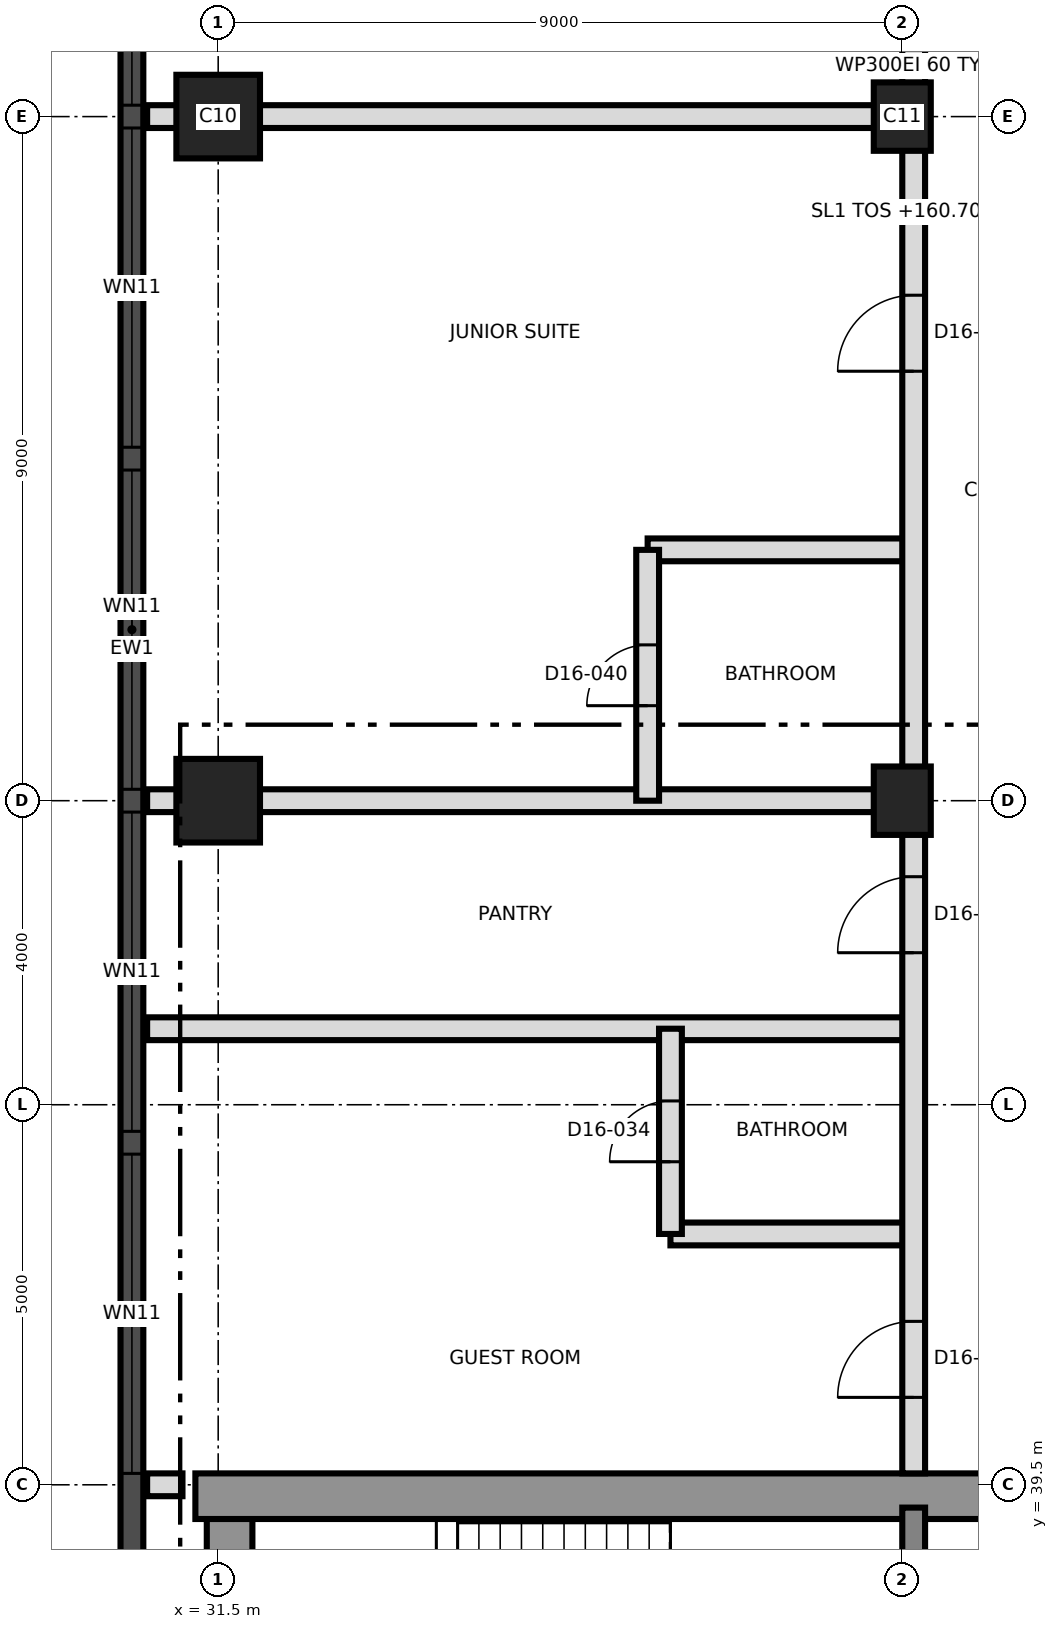
"""IFC4 building model, lengths in metres.
Left out: names, types, materials, properties, quantities, classifications, styles, units other than length and angle.
Written with IfcOpenShell. Run it as: python <this file> out.ifc"""

import sys

from ifc_helpers import new_model, si_unit, direction, frame, frame_2d, origin, origin_2d, place, context, subcontext, project, spatial, rectangle, extrude, element, fill, save


model = new_model("IFC4")
c1 = context("Model", 3, precision=1e-05, world=origin(), true_north=direction((0.0, 1.0)))
c2 = subcontext(c1, "Body", "Model", "MODEL_VIEW")
j1 = project(units=[si_unit("LENGTHUNIT", "METRE"), si_unit("PLANEANGLEUNIT", "RADIAN")], contexts=[c1])
p1 = place(None, origin())
s1 = spatial("IfcSite", under=j1, at=p1, CompositionType="ELEMENT")
p2 = place(p1, origin())
s2 = spatial("IfcBuilding", under=s1, at=p2, CompositionType="ELEMENT")
p3 = place(p2, frame((0.0, 0.0, 160.7)))
s3 = spatial("IfcBuildingStorey", under=s2, at=p3, CompositionType="ELEMENT", Elevation=160.7)
p4 = place(p3, frame((31.65, 21.8, 0.0), z_axis=(0.0, 0.0, 1.0), x_axis=(0.0, 1.0, 0.0)))
e1 = element("IfcWall", 1, at=p4, inside=s3, PredefinedType="SHEAR", context=c2, shape_type="SweptSolid", body=[
    extrude(rectangle(XDim=17.4, YDim=0.6, at=frame_2d((8.7, 0.0))), origin(), (0.0, 0.0, 1.0), 3.7),
])
p5 = place(p3, frame((31.2, 39.35, 0.0), z_axis=(0.0, 0.0, 1.0), x_axis=(1.0, 0.0, 0.0)))
e2 = element("IfcWall", 2, at=p5, inside=s3, PredefinedType="SHEAR", context=c2, shape_type="SweptSolid", body=[
    extrude(rectangle(XDim=27.0, YDim=0.6, at=frame_2d((13.5, 0.0))), origin(), (0.0, 0.0, 1.0), 3.7),
])
p6 = place(p5, frame((10.5, 0.0, 0.0)))
e3 = element("IfcOpeningElement", 3, at=p6, cuts=e2, PredefinedType="OPENING", context=c2, shape_type="SweptSolid", body=[
    extrude(rectangle(XDim=1.2, YDim=2.1, at=frame_2d((0.6, 1.05))), frame((0.0, 0.31, 0.0), z_axis=(0.0, -1.0, 0.0), x_axis=(1.0, 0.0, 0.0)), (0.0, 0.0, 1.0), 0.62),
])
p7 = place(p3, frame((40.65, 33.5, 0.0), z_axis=(0.0, 0.0, 1.0), x_axis=(0.0, 1.0, 0.0)))
e4 = element("IfcWall", 4, at=p7, inside=s3, PredefinedType="SHEAR", context=c2, shape_type="SweptSolid", body=[
    extrude(rectangle(XDim=5.7, YDim=0.3, at=frame_2d((2.85, 0.0))), origin(), (0.0, 0.0, 1.0), 3.7),
])
p8 = place(p3, frame((31.5, 48.5, 0.0), z_axis=(0.0, 0.0, 1.0), x_axis=(1.0, 0.0, 0.0)))
e5 = element("IfcColumn", 5, at=p8, inside=s3, PredefinedType="COLUMN", context=c2, shape_type="SweptSolid", body=[
    extrude(rectangle(XDim=1.1, YDim=1.1, at=origin_2d()), origin(), (0.0, 0.0, 1.0), 3.7),
])
p9 = place(p3, frame((40.5, 48.5, 0.0), z_axis=(0.0, 0.0, 1.0), x_axis=(0.0, 1.0, 0.0)))
e6 = element("IfcColumn", 6, at=p9, inside=s3, PredefinedType="COLUMN", context=c2, shape_type="SweptSolid", body=[
    extrude(rectangle(XDim=0.9, YDim=0.75, at=origin_2d()), origin(), (0.0, 0.0, 1.0), 3.7),
])
p10 = place(p3, frame((31.5, 57.5, 0.0), z_axis=(0.0, 0.0, 1.0), x_axis=(1.0, 0.0, 0.0)))
e7 = element("IfcColumn", 7, at=p10, inside=s3, PredefinedType="COLUMN", context=c2, shape_type="SweptSolid", body=[
    extrude(rectangle(XDim=1.1, YDim=1.1, at=origin_2d()), origin(), (0.0, 0.0, 1.0), 3.7),
])
p11 = place(p3, frame((40.5, 57.5, 0.0), z_axis=(0.0, 0.0, 1.0), x_axis=(0.0, 1.0, 0.0)))
e8 = element("IfcColumn", 8, at=p11, inside=s3, PredefinedType="COLUMN", context=c2, shape_type="SweptSolid", body=[
    extrude(rectangle(XDim=0.9, YDim=0.75, at=origin_2d()), origin(), (0.0, 0.0, 1.0), 3.7),
])
p12 = place(p3, frame((30.365, 66.992, 0.0), z_axis=(0.0, 0.0, 1.0), x_axis=(0.0, -1.0, 0.0)))
e9 = element("IfcWall", 9, at=p12, inside=s3, PredefinedType="SOLIDWALL", context=c2, shape_type="SweptSolid", body=[
    extrude(rectangle(XDim=32.981, YDim=0.3, at=frame_2d((16.491, 0.0))), origin(), (0.0, 0.0, 1.0), 3.4),
])
p13 = place(p12, frame((1.596, 0.0, 0.3)))
e10 = element("IfcOpeningElement", 10, at=p13, cuts=e9, PredefinedType="OPENING", context=c2, shape_type="SweptSolid", body=[
    extrude(rectangle(XDim=1.8, YDim=2.4, at=frame_2d((0.9, 1.2))), frame((0.0, 0.16, 0.0), z_axis=(0.0, -1.0, 0.0), x_axis=(1.0, 0.0, 0.0)), (0.0, 0.0, 1.0), 0.32),
])
p14 = place(p12, frame((5.142, 0.0, 0.9)))
e11 = element("IfcOpeningElement", 11, at=p14, cuts=e9, PredefinedType="OPENING", context=c2, shape_type="SweptSolid", body=[
    extrude(rectangle(XDim=4.2, YDim=1.5, at=frame_2d((2.1, 0.75))), frame((0.0, 0.16, 0.0), z_axis=(0.0, -1.0, 0.0), x_axis=(1.0, 0.0, 0.0)), (0.0, 0.0, 1.0), 0.32),
])
p15 = place(p12, frame((9.642, 0.0, 0.9)))
e12 = element("IfcOpeningElement", 12, at=p15, cuts=e9, PredefinedType="OPENING", context=c2, shape_type="SweptSolid", body=[
    extrude(rectangle(XDim=4.2, YDim=1.5, at=frame_2d((2.1, 0.75))), frame((0.0, 0.16, 0.0), z_axis=(0.0, -1.0, 0.0), x_axis=(1.0, 0.0, 0.0)), (0.0, 0.0, 1.0), 0.32),
])
p16 = place(p12, frame((14.142, 0.0, 0.9)))
e13 = element("IfcOpeningElement", 13, at=p16, cuts=e9, PredefinedType="OPENING", context=c2, shape_type="SweptSolid", body=[
    extrude(rectangle(XDim=4.2, YDim=1.5, at=frame_2d((2.1, 0.75))), frame((0.0, 0.16, 0.0), z_axis=(0.0, -1.0, 0.0), x_axis=(1.0, 0.0, 0.0)), (0.0, 0.0, 1.0), 0.32),
])
p17 = place(p12, frame((18.642, 0.0, 0.9)))
e14 = element("IfcOpeningElement", 14, at=p17, cuts=e9, PredefinedType="OPENING", context=c2, shape_type="SweptSolid", body=[
    extrude(rectangle(XDim=4.2, YDim=1.5, at=frame_2d((2.1, 0.75))), frame((0.0, 0.16, 0.0), z_axis=(0.0, -1.0, 0.0), x_axis=(1.0, 0.0, 0.0)), (0.0, 0.0, 1.0), 0.32),
])
p18 = place(p12, frame((23.142, 0.0, 0.9)))
e15 = element("IfcOpeningElement", 15, at=p18, cuts=e9, PredefinedType="OPENING", context=c2, shape_type="SweptSolid", body=[
    extrude(rectangle(XDim=4.2, YDim=1.5, at=frame_2d((2.1, 0.75))), frame((0.0, 0.16, 0.0), z_axis=(0.0, -1.0, 0.0), x_axis=(1.0, 0.0, 0.0)), (0.0, 0.0, 1.0), 0.32),
])
p19 = place(p12, frame((29.337, 0.0, 0.3)))
e16 = element("IfcOpeningElement", 16, at=p19, cuts=e9, PredefinedType="OPENING", context=c2, shape_type="SweptSolid", body=[
    extrude(rectangle(XDim=1.8, YDim=2.4, at=frame_2d((0.9, 1.2))), frame((0.0, 0.16, 0.0), z_axis=(0.0, -1.0, 0.0), x_axis=(1.0, 0.0, 0.0)), (0.0, 0.0, 1.0), 0.32),
])
p20 = place(p3, frame((30.565, 39.5, 0.0), z_axis=(0.0, 0.0, 1.0), x_axis=(1.0, 0.0, 0.0)))
e17 = element("IfcWall", 17, at=p20, inside=s3, PredefinedType="PARTITIONING", context=c2, shape_type="SweptSolid", body=[
    extrude(rectangle(XDim=0.465, YDim=0.3, at=frame_2d((0.232, 0.0))), origin(), (0.0, 0.0, 1.0), 3.4),
])
p21 = place(p3, frame((37.45, 42.8, 0.0), z_axis=(0.0, 0.0, 1.0), x_axis=(1.0, 0.0, 0.0)))
e18 = element("IfcWall", 18, at=p21, inside=s3, PredefinedType="PARTITIONING", context=c2, shape_type="SweptSolid", body=[
    extrude(rectangle(XDim=3.2, YDim=0.3, at=frame_2d((1.6, 0.0))), origin(), (0.0, 0.0, 1.0), 3.4),
])
for number, where, z_axis, x_axis in (
    (19, (30.565, 45.5, 0.0), (0.0, 0.0, 1.0), (1.0, 0.0, 0.0)),
    (20, (30.565, 48.5, 0.0), (0.0, 0.0, 1.0), (1.0, 0.0, 0.0)),
):
    element("IfcWall", number, at=place(p3, frame(where, z_axis=z_axis, x_axis=x_axis)), inside=s3, PredefinedType="PARTITIONING", context=c2, shape_type="SweptSolid", body=[
        extrude(rectangle(XDim=10.085, YDim=0.3, at=frame_2d((5.042, 0.0))), origin(), (0.0, 0.0, 1.0), 3.4),
    ])
p22 = place(p3, frame((37.15, 51.8, 0.0), z_axis=(0.0, 0.0, 1.0), x_axis=(1.0, 0.0, 0.0)))
e21 = element("IfcWall", 21, at=p22, inside=s3, PredefinedType="PARTITIONING", context=c2, shape_type="SweptSolid", body=[
    extrude(rectangle(XDim=3.5, YDim=0.3, at=frame_2d((1.75, 0.0))), origin(), (0.0, 0.0, 1.0), 3.4),
])
p23 = place(p3, frame((30.565, 57.5, 0.0), z_axis=(0.0, 0.0, 1.0), x_axis=(1.0, 0.0, 0.0)))
e22 = element("IfcWall", 22, at=p23, inside=s3, PredefinedType="PARTITIONING", context=c2, shape_type="SweptSolid", body=[
    extrude(rectangle(XDim=10.085, YDim=0.3, at=frame_2d((5.042, 0.0))), origin(), (0.0, 0.0, 1.0), 3.4),
])
p24 = place(p3, frame((37.15, 48.5, 0.0), z_axis=(0.0, 0.0, 1.0), x_axis=(0.0, 1.0, 0.0)))
e23 = element("IfcWall", 23, at=p24, inside=s3, PredefinedType="PARTITIONING", context=c2, shape_type="SweptSolid", body=[
    extrude(rectangle(XDim=3.3, YDim=0.3, at=frame_2d((1.65, 0.0))), origin(), (0.0, 0.0, 1.0), 3.4),
])
p25 = place(p24, frame((1.25, 0.0, 0.0)))
e24 = element("IfcOpeningElement", 24, at=p25, cuts=e23, PredefinedType="OPENING", context=c2, shape_type="SweptSolid", body=[
    extrude(rectangle(XDim=0.8, YDim=2.1, at=frame_2d((0.4, 1.05))), frame((0.0, 0.16, 0.0), z_axis=(0.0, -1.0, 0.0), x_axis=(1.0, 0.0, 0.0)), (0.0, 0.0, 1.0), 0.32),
])
p26 = place(p3, frame((37.45, 42.8, 0.0), z_axis=(0.0, 0.0, 1.0), x_axis=(0.0, 1.0, 0.0)))
e25 = element("IfcWall", 25, at=p26, inside=s3, PredefinedType="PARTITIONING", context=c2, shape_type="SweptSolid", body=[
    extrude(rectangle(XDim=2.7, YDim=0.3, at=frame_2d((1.35, 0.0))), origin(), (0.0, 0.0, 1.0), 3.4),
])
p27 = place(p26, frame((0.95, 0.0, 0.0)))
e26 = element("IfcOpeningElement", 26, at=p27, cuts=e25, PredefinedType="OPENING", context=c2, shape_type="SweptSolid", body=[
    extrude(rectangle(XDim=0.8, YDim=2.1, at=frame_2d((0.4, 1.05))), frame((0.0, 0.16, 0.0), z_axis=(0.0, -1.0, 0.0), x_axis=(1.0, 0.0, 0.0)), (0.0, 0.0, 1.0), 0.32),
])
p28 = place(p3, frame((40.65, 39.65, 0.0), z_axis=(0.0, 0.0, 1.0), x_axis=(0.0, 1.0, 0.0)))
e27 = element("IfcWall", 27, at=p28, inside=s3, PredefinedType="PARTITIONING", context=c2, shape_type="SweptSolid", body=[
    extrude(rectangle(XDim=37.025, YDim=0.3, at=frame_2d((18.513, 0.0))), origin(), (0.0, 0.0, 1.0), 3.4),
])
p29 = place(p28, frame((1.0, 0.0, 0.0)))
e28 = element("IfcOpeningElement", 28, at=p29, cuts=e27, PredefinedType="OPENING", context=c2, shape_type="SweptSolid", body=[
    extrude(rectangle(XDim=1.0, YDim=2.1, at=frame_2d((0.5, 1.05))), frame((0.0, 0.16, 0.0), z_axis=(0.0, -1.0, 0.0), x_axis=(1.0, 0.0, 0.0)), (0.0, 0.0, 1.0), 0.32),
])
p30 = place(p28, frame((6.85, 0.0, 0.0)))
e29 = element("IfcOpeningElement", 29, at=p30, cuts=e27, PredefinedType="OPENING", context=c2, shape_type="SweptSolid", body=[
    extrude(rectangle(XDim=1.0, YDim=2.1, at=frame_2d((0.5, 1.05))), frame((0.0, 0.16, 0.0), z_axis=(0.0, -1.0, 0.0), x_axis=(1.0, 0.0, 0.0)), (0.0, 0.0, 1.0), 0.32),
])
p31 = place(p28, frame((14.5, 0.0, 0.0)))
e30 = element("IfcOpeningElement", 30, at=p31, cuts=e27, PredefinedType="OPENING", context=c2, shape_type="SweptSolid", body=[
    extrude(rectangle(XDim=1.0, YDim=2.4, at=frame_2d((0.5, 1.2))), frame((0.0, 0.16, 0.0), z_axis=(0.0, -1.0, 0.0), x_axis=(1.0, 0.0, 0.0)), (0.0, 0.0, 1.0), 0.32),
])
p32 = place(p28, frame((21.35, 0.0, 0.0)))
e31 = element("IfcOpeningElement", 31, at=p32, cuts=e27, PredefinedType="OPENING", context=c2, shape_type="SweptSolid", body=[
    extrude(rectangle(XDim=1.0, YDim=2.4, at=frame_2d((0.5, 1.2))), frame((0.0, 0.16, 0.0), z_axis=(0.0, -1.0, 0.0), x_axis=(1.0, 0.0, 0.0)), (0.0, 0.0, 1.0), 0.32),
])
p33 = place(p14, origin())
e32 = element("IfcWindow", 32, at=p33, inside=s3, PartitioningType="SINGLE_PANEL", PredefinedType="WINDOW", context=c2, shape_type="SweptSolid", body=[
    extrude(rectangle(XDim=4.2, YDim=1.5, at=frame_2d((2.1, 0.75))), frame((0.0, 0.03, 0.0), z_axis=(0.0, -1.0, 0.0), x_axis=(1.0, 0.0, 0.0)), (0.0, 0.0, 1.0), 0.06),
])
fill(e11, e32)
p34 = place(p15, origin())
e33 = element("IfcWindow", 33, at=p34, inside=s3, PartitioningType="SINGLE_PANEL", PredefinedType="WINDOW", context=c2, shape_type="SweptSolid", body=[
    extrude(rectangle(XDim=4.2, YDim=1.5, at=frame_2d((2.1, 0.75))), frame((0.0, 0.03, 0.0), z_axis=(0.0, -1.0, 0.0), x_axis=(1.0, 0.0, 0.0)), (0.0, 0.0, 1.0), 0.06),
])
fill(e12, e33)
p35 = place(p16, origin())
e34 = element("IfcWindow", 34, at=p35, inside=s3, PartitioningType="SINGLE_PANEL", PredefinedType="WINDOW", context=c2, shape_type="SweptSolid", body=[
    extrude(rectangle(XDim=4.2, YDim=1.5, at=frame_2d((2.1, 0.75))), frame((0.0, 0.03, 0.0), z_axis=(0.0, -1.0, 0.0), x_axis=(1.0, 0.0, 0.0)), (0.0, 0.0, 1.0), 0.06),
])
fill(e13, e34)
p36 = place(p17, origin())
e35 = element("IfcWindow", 35, at=p36, inside=s3, PartitioningType="SINGLE_PANEL", PredefinedType="WINDOW", context=c2, shape_type="SweptSolid", body=[
    extrude(rectangle(XDim=4.2, YDim=1.5, at=frame_2d((2.1, 0.75))), frame((0.0, 0.03, 0.0), z_axis=(0.0, -1.0, 0.0), x_axis=(1.0, 0.0, 0.0)), (0.0, 0.0, 1.0), 0.06),
])
fill(e14, e35)
p37 = place(p18, origin())
e36 = element("IfcWindow", 36, at=p37, inside=s3, PartitioningType="SINGLE_PANEL", PredefinedType="WINDOW", context=c2, shape_type="SweptSolid", body=[
    extrude(rectangle(XDim=4.2, YDim=1.5, at=frame_2d((2.1, 0.75))), frame((0.0, 0.03, 0.0), z_axis=(0.0, -1.0, 0.0), x_axis=(1.0, 0.0, 0.0)), (0.0, 0.0, 1.0), 0.06),
])
fill(e15, e36)
p38 = place(p27, origin())
e37 = element("IfcDoor", 37, at=p38, inside=s3, OperationType="SINGLE_SWING_LEFT", PredefinedType="DOOR", context=c2, shape_type="SweptSolid", body=[
    extrude(rectangle(XDim=0.8, YDim=2.1, at=frame_2d((0.4, 1.05))), frame((0.0, 0.025, 0.0), z_axis=(0.0, -1.0, 0.0), x_axis=(1.0, 0.0, 0.0)), (0.0, 0.0, 1.0), 0.05),
])
fill(e26, e37)
p39 = place(p29, origin())
e38 = element("IfcDoor", 38, at=p39, inside=s3, OperationType="SINGLE_SWING_RIGHT", PredefinedType="DOOR", context=c2, shape_type="SweptSolid", body=[
    extrude(rectangle(XDim=1.0, YDim=2.1, at=frame_2d((0.5, 1.05))), frame((0.0, 0.025, 0.0), z_axis=(0.0, -1.0, 0.0), x_axis=(1.0, 0.0, 0.0)), (0.0, 0.0, 1.0), 0.05),
])
fill(e28, e38)
p40 = place(p30, origin())
e39 = element("IfcDoor", 39, at=p40, inside=s3, OperationType="SINGLE_SWING_LEFT", PredefinedType="DOOR", context=c2, shape_type="SweptSolid", body=[
    extrude(rectangle(XDim=1.0, YDim=2.1, at=frame_2d((0.5, 1.05))), frame((0.0, 0.025, 0.0), z_axis=(0.0, -1.0, 0.0), x_axis=(1.0, 0.0, 0.0)), (0.0, 0.0, 1.0), 0.05),
])
fill(e29, e39)
p41 = place(p25, origin())
e40 = element("IfcDoor", 40, at=p41, inside=s3, OperationType="SINGLE_SWING_LEFT", PredefinedType="DOOR", context=c2, shape_type="SweptSolid", body=[
    extrude(rectangle(XDim=0.8, YDim=2.1, at=frame_2d((0.4, 1.05))), frame((0.0, 0.025, 0.0), z_axis=(0.0, -1.0, 0.0), x_axis=(1.0, 0.0, 0.0)), (0.0, 0.0, 1.0), 0.05),
])
fill(e24, e40)
p42 = place(p31, origin())
e41 = element("IfcDoor", 41, at=p42, inside=s3, OperationType="SINGLE_SWING_RIGHT", PredefinedType="DOOR", context=c2, shape_type="SweptSolid", body=[
    extrude(rectangle(XDim=1.0, YDim=2.4, at=frame_2d((0.5, 1.2))), frame((0.0, 0.025, 0.0), z_axis=(0.0, -1.0, 0.0), x_axis=(1.0, 0.0, 0.0)), (0.0, 0.0, 1.0), 0.05),
])
fill(e30, e41)
save(model, sys.argv[1])
